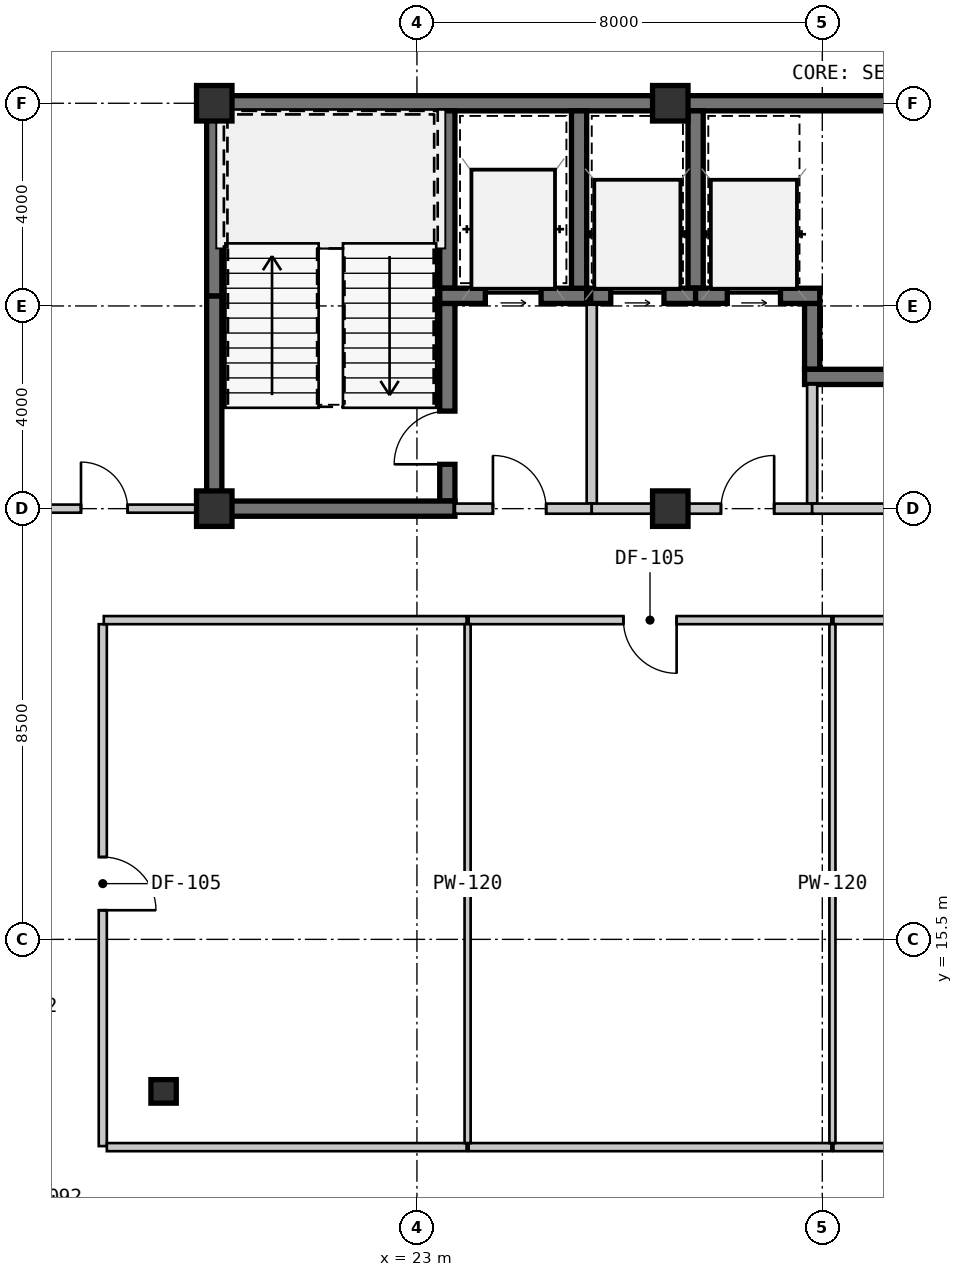
"""IFC4 building model, lengths in metres.
Left out: names, types, materials, properties, quantities, classifications, styles, units other than length and angle.
Written with IfcOpenShell. Run it as: python <this file> out.ifc"""

import sys

from ifc_helpers import new_model, si_unit, direction, frame, frame_2d, origin, origin_2d, place, context, subcontext, project, spatial, rectangle, i_section, extrude, source, transform, mapped, element, fill, save


model = new_model("IFC4")
c1 = context("Model", 3, precision=1e-05, world=origin(), true_north=direction((0.0, 1.0)))
c2 = subcontext(c1, "Body", "Model", "MODEL_VIEW")
j1 = project(units=[si_unit("LENGTHUNIT", "METRE"), si_unit("PLANEANGLEUNIT", "RADIAN")], contexts=[c1])
p1 = place(None, origin())
s1 = spatial("IfcSite", under=j1, at=p1, CompositionType="ELEMENT")
p2 = place(p1, origin())
s2 = spatial("IfcBuilding", under=s1, at=p2, CompositionType="ELEMENT")
p3 = place(p2, frame((0.0, 0.0, 93.45)))
s3 = spatial("IfcBuildingStorey", under=s2, at=p3, CompositionType="ELEMENT", Elevation=93.45)
m1 = source(origin(), c2, "Body", "SweptSolid", [
    extrude(rectangle(XDim=0.7, YDim=0.7, at=origin_2d()), origin(), (0.0, 0.0, 1.0), 3.15),
])
for number, where, z_axis, x_axis in (
    (1, (19.0, 24.0, 0.0), (0.0, 0.0, 1.0), (1.0, 0.0, 0.0)),
    (2, (28.0, 24.0, 0.0), (0.0, 0.0, 1.0), (1.0, 0.0, 0.0)),
    (3, (19.0, 32.0, 0.0), (0.0, 0.0, 1.0), (1.0, 0.0, 0.0)),
    (4, (28.0, 32.0, 0.0), (0.0, 0.0, 1.0), (1.0, 0.0, 0.0)),
):
    element("IfcColumn", number, at=place(p3, frame(where, z_axis=z_axis, x_axis=x_axis)), inside=s3, PredefinedType="COLUMN", context=c2, shape_type="MappedRepresentation", body=[
        mapped(m1, transform((0.0, 0.0, 0.0), scale=1.0)),
    ])
m2 = source(origin(), c2, "Body", "SweptSolid", [
    extrude(i_section(OverallWidth=0.5, OverallDepth=0.464, WebThickness=0.022, FlangeThickness=0.034, at=origin_2d()), origin(), (0.0, 0.0, 1.0), 3.15),
])
p4 = place(p3, frame((18.0, 12.5, 0.0), z_axis=(0.0, 0.0, 1.0), x_axis=(1.0, 0.0, 0.0)))
e5 = element("IfcColumn", 5, at=p4, inside=s3, PredefinedType="COLUMN", context=c2, shape_type="MappedRepresentation", body=[
    mapped(m2, transform((0.0, 0.0, 0.0), scale=1.0)),
])
m3 = source(origin(), c2, "Body", "SweptSolid", [
    extrude(rectangle(XDim=9.15, YDim=0.3, at=frame_2d((4.575, 0.0))), origin(), (0.0, 0.0, 1.0), 2.93),
])
p5 = place(p3, frame((18.85, 32.0, 0.0), z_axis=(0.0, 0.0, 1.0), x_axis=(1.0, 0.0, 0.0)))
e6 = element("IfcWall", 6, at=p5, inside=s3, PredefinedType="SHEAR", context=c2, shape_type="MappedRepresentation", body=[
    mapped(m3, transform((0.0, 0.0, 0.0), scale=1.0)),
])
m4 = source(origin(), c2, "Body", "SweptSolid", [
    extrude(rectangle(XDim=11.2, YDim=0.3, at=frame_2d((5.6, 0.0))), origin(), (0.0, 0.0, 1.0), 2.93),
])
p6 = place(p3, frame((28.0, 32.0, 0.0), z_axis=(0.0, 0.0, 1.0), x_axis=(1.0, 0.0, 0.0)))
e7 = element("IfcWall", 7, at=p6, inside=s3, PredefinedType="SHEAR", context=c2, shape_type="MappedRepresentation", body=[
    mapped(m4, transform((0.0, 0.0, 0.0), scale=1.0)),
])
m5 = source(origin(), c2, "Body", "SweptSolid", [
    extrude(rectangle(XDim=4.05, YDim=0.3, at=frame_2d((2.025, 0.0))), origin(), (0.0, 0.0, 1.0), 2.93),
])
p7 = place(p3, frame((19.0, 24.15, 0.0), z_axis=(0.0, 0.0, 1.0), x_axis=(0.0, 1.0, 0.0)))
e8 = element("IfcWall", 8, at=p7, inside=s3, PredefinedType="SHEAR", context=c2, shape_type="MappedRepresentation", body=[
    mapped(m5, transform((0.0, 0.0, 0.0), scale=1.0)),
])
m6 = source(origin(), c2, "Body", "SweptSolid", [
    extrude(rectangle(XDim=3.65, YDim=0.3, at=frame_2d((1.825, 0.0))), origin(), (0.0, 0.0, 1.0), 2.93),
])
p8 = place(p3, frame((19.0, 28.2, 0.0), z_axis=(0.0, 0.0, 1.0), x_axis=(0.0, 1.0, 0.0)))
e9 = element("IfcWall", 9, at=p8, inside=s3, PredefinedType="SHEAR", context=c2, shape_type="MappedRepresentation", body=[
    mapped(m6, transform((0.0, 0.0, 0.0), scale=1.0)),
])
m7 = source(origin(), c2, "Body", "SweptSolid", [
    extrude(rectangle(XDim=3.5, YDim=0.3, at=frame_2d((1.75, 0.0))), origin(), (0.0, 0.0, 1.0), 2.93),
])
p9 = place(p3, frame((23.6, 28.35, 0.0), z_axis=(0.0, 0.0, 1.0), x_axis=(0.0, 1.0, 0.0)))
e10 = element("IfcWall", 10, at=p9, inside=s3, PredefinedType="SHEAR", context=c2, shape_type="MappedRepresentation", body=[
    mapped(m7, transform((0.0, 0.0, 0.0), scale=1.0)),
])
m8 = source(origin(), c2, "Body", "SweptSolid", [
    extrude(rectangle(XDim=3.9, YDim=0.3, at=frame_2d((1.95, 0.0))), origin(), (0.0, 0.0, 1.0), 2.93),
])
p10 = place(p3, frame((23.6, 24.15, 0.0), z_axis=(0.0, 0.0, 1.0), x_axis=(0.0, 1.0, 0.0)))
e11 = element("IfcWall", 11, at=p10, inside=s3, PredefinedType="SHEAR", context=c2, shape_type="MappedRepresentation", body=[
    mapped(m8, transform((0.0, 0.0, 0.0), scale=1.0)),
])
m9 = source(origin(), c2, "Body", "SweptSolid", [
    extrude(rectangle(XDim=1.05, YDim=2.1, at=frame_2d((0.525, 1.05))), frame((0.0, 0.16, 0.0), z_axis=(0.0, -1.0, 0.0), x_axis=(1.0, 0.0, 0.0)), (0.0, 0.0, 1.0), 0.32),
])
p11 = place(p10, frame((0.725, 0.0, 0.0)))
e12 = element("IfcOpeningElement", 12, at=p11, cuts=e11, PredefinedType="OPENING", context=c2, shape_type="MappedRepresentation", body=[
    mapped(m9, transform((0.0, 0.0, 0.0), scale=1.0)),
])
m10 = source(origin(), c2, "Body", "SweptSolid", [
    extrude(rectangle(XDim=4.9, YDim=0.3, at=frame_2d((2.45, 0.0))), origin(), (0.0, 0.0, 1.0), 2.93),
])
p12 = place(p3, frame((18.85, 24.0, 0.0), z_axis=(0.0, 0.0, 1.0), x_axis=(1.0, 0.0, 0.0)))
e13 = element("IfcWall", 13, at=p12, inside=s3, PredefinedType="SHEAR", context=c2, shape_type="MappedRepresentation", body=[
    mapped(m10, transform((0.0, 0.0, 0.0), scale=1.0)),
])
m11 = source(origin(), c2, "Body", "SweptSolid", [
    extrude(rectangle(XDim=2.9, YDim=0.3, at=frame_2d((1.45, 0.0))), origin(), (0.0, 0.0, 1.0), 2.93),
])
p13 = place(p3, frame((23.45, 28.2, 0.0), z_axis=(0.0, 0.0, 1.0), x_axis=(1.0, 0.0, 0.0)))
e14 = element("IfcWall", 14, at=p13, inside=s3, PredefinedType="SHEAR", context=c2, shape_type="MappedRepresentation", body=[
    mapped(m11, transform((0.0, 0.0, 0.0), scale=1.0)),
])
m12 = source(origin(), c2, "Body", "SweptSolid", [
    extrude(rectangle(XDim=1.1, YDim=2.15, at=frame_2d((0.55, 1.075))), frame((0.0, 0.16, 0.0), z_axis=(0.0, -1.0, 0.0), x_axis=(1.0, 0.0, 0.0)), (0.0, 0.0, 1.0), 0.32),
])
p14 = place(p13, frame((0.9, 0.0, 0.0)))
e15 = element("IfcOpeningElement", 15, at=p14, cuts=e14, PredefinedType="OPENING", context=c2, shape_type="MappedRepresentation", body=[
    mapped(m12, transform((0.0, 0.0, 0.0), scale=1.0)),
])
p15 = place(p3, frame((26.2, 28.35, 0.0), z_axis=(0.0, 0.0, 1.0), x_axis=(0.0, 1.0, 0.0)))
e16 = element("IfcWall", 16, at=p15, inside=s3, PredefinedType="SHEAR", context=c2, shape_type="MappedRepresentation", body=[
    mapped(m7, transform((0.0, 0.0, 0.0), scale=1.0)),
])
m13 = source(origin(), c2, "Body", "SweptSolid", [
    extrude(rectangle(XDim=3.95, YDim=0.2, at=frame_2d((1.975, 0.0))), origin(), (0.0, 0.0, 1.0), 2.93),
])
p16 = place(p3, frame((26.45, 24.1, 0.0), z_axis=(0.0, 0.0, 1.0), x_axis=(0.0, 1.0, 0.0)))
e17 = element("IfcWall", 17, at=p16, inside=s3, PredefinedType="SOLIDWALL", context=c2, shape_type="MappedRepresentation", body=[
    mapped(m13, transform((0.0, 0.0, 0.0), scale=1.0)),
])
m14 = source(origin(), c2, "Body", "SweptSolid", [
    extrude(rectangle(XDim=2.7, YDim=0.2, at=frame_2d((1.35, 0.0))), origin(), (0.0, 0.0, 1.0), 2.47),
])
p17 = place(p3, frame((23.75, 24.0, 0.0), z_axis=(0.0, 0.0, 1.0), x_axis=(1.0, 0.0, 0.0)))
e18 = element("IfcWall", 18, at=p17, inside=s3, PredefinedType="SOLIDWALL", context=c2, shape_type="MappedRepresentation", body=[
    mapped(m14, transform((0.0, 0.0, 0.0), scale=1.0)),
])
m15 = source(origin(), c2, "Body", "SweptSolid", [
    extrude(rectangle(XDim=1.05, YDim=2.1, at=frame_2d((0.525, 1.05))), frame((0.0, 0.11, 0.0), z_axis=(0.0, -1.0, 0.0), x_axis=(1.0, 0.0, 0.0)), (0.0, 0.0, 1.0), 0.22),
])
p18 = place(p17, frame((0.75, 0.0, 0.0)))
e19 = element("IfcOpeningElement", 19, at=p18, cuts=e18, PredefinedType="OPENING", context=c2, shape_type="MappedRepresentation", body=[
    mapped(m15, transform((0.0, 0.0, 0.0), scale=1.0)),
])
m16 = source(origin(), c2, "Body", "SweptSolid", [
    extrude(rectangle(XDim=1.3, YDim=0.3, at=frame_2d((0.65, 0.0))), origin(), (0.0, 0.0, 1.0), 2.93),
])
p19 = place(p3, frame((30.8, 28.05, 0.0), z_axis=(0.0, 0.0, 1.0), x_axis=(0.0, -1.0, 0.0)))
e20 = element("IfcWall", 20, at=p19, inside=s3, PredefinedType="SHEAR", context=c2, shape_type="MappedRepresentation", body=[
    mapped(m16, transform((0.0, 0.0, 0.0), scale=1.0)),
])
m17 = source(origin(), c2, "Body", "SweptSolid", [
    extrude(rectangle(XDim=2.35, YDim=0.3, at=frame_2d((1.175, 0.0))), origin(), (0.0, 0.0, 1.0), 2.93),
])
p20 = place(p3, frame((30.65, 26.6, 0.0), z_axis=(0.0, 0.0, 1.0), x_axis=(1.0, 0.0, 0.0)))
e21 = element("IfcWall", 21, at=p20, inside=s3, PredefinedType="SHEAR", context=c2, shape_type="MappedRepresentation", body=[
    mapped(m17, transform((0.0, 0.0, 0.0), scale=1.0)),
])
p21 = place(p3, frame((28.5, 28.35, 0.0), z_axis=(0.0, 0.0, 1.0), x_axis=(0.0, 1.0, 0.0)))
e22 = element("IfcWall", 22, at=p21, inside=s3, PredefinedType="SHEAR", context=c2, shape_type="MappedRepresentation", body=[
    mapped(m7, transform((0.0, 0.0, 0.0), scale=1.0)),
])
m18 = source(origin(), c2, "Body", "SweptSolid", [
    extrude(rectangle(XDim=2.07, YDim=0.3, at=frame_2d((1.035, 0.0))), origin(), (0.0, 0.0, 1.0), 2.93),
])
p22 = place(p3, frame((26.43, 28.2, 0.0), z_axis=(0.0, 0.0, 1.0), x_axis=(1.0, 0.0, 0.0)))
e23 = element("IfcWall", 23, at=p22, inside=s3, PredefinedType="SHEAR", context=c2, shape_type="MappedRepresentation", body=[
    mapped(m18, transform((0.0, 0.0, 0.0), scale=1.0)),
])
m19 = source(origin(), c2, "Body", "SweptSolid", [
    extrude(rectangle(XDim=1.05, YDim=2.15, at=frame_2d((0.525, 1.075))), frame((0.0, 0.16, 0.0), z_axis=(0.0, -1.0, 0.0), x_axis=(1.0, 0.0, 0.0)), (0.0, 0.0, 1.0), 0.32),
])
p23 = place(p22, frame((0.395, 0.0, 0.0)))
e24 = element("IfcOpeningElement", 24, at=p23, cuts=e23, PredefinedType="OPENING", context=c2, shape_type="MappedRepresentation", body=[
    mapped(m19, transform((0.0, 0.0, 0.0), scale=1.0)),
])
m20 = source(origin(), c2, "Body", "SweptSolid", [
    extrude(rectangle(XDim=2.45, YDim=0.3, at=frame_2d((1.225, 0.0))), origin(), (0.0, 0.0, 1.0), 2.93),
])
p24 = place(p3, frame((28.5, 28.2, 0.0), z_axis=(0.0, 0.0, 1.0), x_axis=(1.0, 0.0, 0.0)))
e25 = element("IfcWall", 25, at=p24, inside=s3, PredefinedType="SHEAR", context=c2, shape_type="MappedRepresentation", body=[
    mapped(m20, transform((0.0, 0.0, 0.0), scale=1.0)),
])
p25 = place(p24, frame((0.625, 0.0, 0.0)))
e26 = element("IfcOpeningElement", 26, at=p25, cuts=e25, PredefinedType="OPENING", context=c2, shape_type="MappedRepresentation", body=[
    mapped(m19, transform((0.0, 0.0, 0.0), scale=1.0)),
])
m21 = source(origin(), c2, "Body", "SweptSolid", [
    extrude(rectangle(XDim=2.35, YDim=0.2, at=frame_2d((1.175, 0.0))), origin(), (0.0, 0.0, 1.0), 2.93),
])
p26 = place(p3, frame((30.8, 26.45, 0.0), z_axis=(0.0, 0.0, 1.0), x_axis=(0.0, -1.0, 0.0)))
e27 = element("IfcWall", 27, at=p26, inside=s3, PredefinedType="SOLIDWALL", context=c2, shape_type="MappedRepresentation", body=[
    mapped(m21, transform((0.0, 0.0, 0.0), scale=1.0)),
])
m22 = source(origin(), c2, "Body", "SweptSolid", [
    extrude(rectangle(XDim=4.35, YDim=0.2, at=frame_2d((2.175, 0.0))), origin(), (0.0, 0.0, 1.0), 2.47),
])
p27 = place(p3, frame((30.8, 24.0, 0.0), z_axis=(0.0, 0.0, 1.0), x_axis=(-1.0, 0.0, 0.0)))
e28 = element("IfcWall", 28, at=p27, inside=s3, PredefinedType="SOLIDWALL", context=c2, shape_type="MappedRepresentation", body=[
    mapped(m22, transform((0.0, 0.0, 0.0), scale=1.0)),
])
p28 = place(p27, frame((0.75, 0.0, 0.0)))
e29 = element("IfcOpeningElement", 29, at=p28, cuts=e28, PredefinedType="OPENING", context=c2, shape_type="MappedRepresentation", body=[
    mapped(m15, transform((0.0, 0.0, 0.0), scale=1.0)),
])
m23 = source(origin(), c2, "Body", "SweptSolid", [
    extrude(rectangle(XDim=4.35, YDim=0.2, at=frame_2d((2.175, 0.0))), origin(), (0.0, 0.0, 1.0), 2.47),
])
p29 = place(p3, frame((35.15, 24.0, 0.0), z_axis=(0.0, 0.0, 1.0), x_axis=(-1.0, 0.0, 0.0)))
e30 = element("IfcWall", 30, at=p29, inside=s3, PredefinedType="SOLIDWALL", context=c2, shape_type="MappedRepresentation", body=[
    mapped(m23, transform((0.0, 0.0, 0.0), scale=1.0)),
])
p30 = place(p29, frame((1.65, 0.0, 0.0)))
e31 = element("IfcOpeningElement", 31, at=p30, cuts=e30, PredefinedType="OPENING", context=c2, shape_type="MappedRepresentation", body=[
    mapped(m15, transform((0.0, 0.0, 0.0), scale=1.0)),
])
m24 = source(origin(), c2, "Body", "SweptSolid", [
    extrude(rectangle(XDim=10.3, YDim=0.16, at=frame_2d((5.15, 0.0))), origin(), (0.0, 0.0, 1.0), 2.93),
])
p31 = place(p3, frame((16.8, 21.72, 0.0), z_axis=(0.0, 0.0, 1.0), x_axis=(0.0, -1.0, 0.0)))
e32 = element("IfcWall", 32, at=p31, inside=s3, PredefinedType="PARTITIONING", context=c2, shape_type="MappedRepresentation", body=[
    mapped(m24, transform((0.0, 0.0, 0.0), scale=1.0)),
])
m25 = source(origin(), c2, "Body", "SweptSolid", [
    extrude(rectangle(XDim=1.05, YDim=2.1, at=frame_2d((0.525, 1.05))), frame((0.0, 0.09, 0.0), z_axis=(0.0, -1.0, 0.0), x_axis=(1.0, 0.0, 0.0)), (0.0, 0.0, 1.0), 0.18),
])
p32 = place(p31, frame((4.595, 0.0, 0.0)))
e33 = element("IfcOpeningElement", 33, at=p32, cuts=e32, PredefinedType="OPENING", context=c2, shape_type="MappedRepresentation", body=[
    mapped(m25, transform((0.0, 0.0, 0.0), scale=1.0)),
])
m26 = source(origin(), c2, "Body", "SweptSolid", [
    extrude(rectangle(XDim=7.159, YDim=0.16, at=frame_2d((3.58, 0.0))), origin(), (0.0, 0.0, 1.0), 2.93),
])
p33 = place(p3, frame((23.98, 21.8, 0.0), z_axis=(0.0, 0.0, 1.0), x_axis=(-1.0, 0.0, 0.0)))
e34 = element("IfcWall", 34, at=p33, inside=s3, PredefinedType="PARTITIONING", context=c2, shape_type="MappedRepresentation", body=[
    mapped(m26, transform((0.0, 0.0, 0.0), scale=1.0)),
])
p34 = place(p3, frame((31.18, 21.8, 0.0), z_axis=(0.0, 0.0, 1.0), x_axis=(-1.0, 0.0, 0.0)))
e35 = element("IfcWall", 35, at=p34, inside=s3, PredefinedType="PARTITIONING", context=c2, shape_type="MappedRepresentation", body=[
    mapped(m26, transform((0.0, 0.0, 0.0), scale=1.0)),
])
p35 = place(p34, frame((3.055, 0.0, 0.0)))
e36 = element("IfcOpeningElement", 36, at=p35, cuts=e35, PredefinedType="OPENING", context=c2, shape_type="MappedRepresentation", body=[
    mapped(m25, transform((0.0, 0.0, 0.0), scale=1.0)),
])
m27 = source(origin(), c2, "Body", "SweptSolid", [
    extrude(rectangle(XDim=7.26, YDim=0.16, at=frame_2d((3.63, 0.0))), origin(), (0.0, 0.0, 1.0), 2.93),
])
p36 = place(p3, frame((38.48, 21.8, 0.0), z_axis=(0.0, 0.0, 1.0), x_axis=(-1.0, 0.0, 0.0)))
e37 = element("IfcWall", 37, at=p36, inside=s3, PredefinedType="PARTITIONING", context=c2, shape_type="MappedRepresentation", body=[
    mapped(m27, transform((0.0, 0.0, 0.0), scale=1.0)),
])
p37 = place(p36, frame((3.105, 0.0, 0.0)))
e38 = element("IfcOpeningElement", 38, at=p37, cuts=e37, PredefinedType="OPENING", context=c2, shape_type="MappedRepresentation", body=[
    mapped(m25, transform((0.0, 0.0, 0.0), scale=1.0)),
])
m28 = source(origin(), c2, "Body", "SweptSolid", [
    extrude(rectangle(XDim=4.17, YDim=0.16, at=frame_2d((2.085, 0.0))), origin(), (0.0, 0.0, 1.0), 2.93),
])
p38 = place(p3, frame((14.68, 24.0, 0.0), z_axis=(0.0, 0.0, 1.0), x_axis=(1.0, 0.0, 0.0)))
e39 = element("IfcWall", 39, at=p38, inside=s3, PredefinedType="PARTITIONING", context=c2, shape_type="MappedRepresentation", body=[
    mapped(m28, transform((0.0, 0.0, 0.0), scale=1.0)),
])
m29 = source(origin(), c2, "Body", "SweptSolid", [
    extrude(rectangle(XDim=0.92, YDim=2.1, at=frame_2d((0.46, 1.05))), frame((0.0, 0.09, 0.0), z_axis=(0.0, -1.0, 0.0), x_axis=(1.0, 0.0, 0.0)), (0.0, 0.0, 1.0), 0.18),
])
p39 = place(p38, frame((1.69, 0.0, 0.0)))
e40 = element("IfcOpeningElement", 40, at=p39, cuts=e39, PredefinedType="OPENING", context=c2, shape_type="MappedRepresentation", body=[
    mapped(m29, transform((0.0, 0.0, 0.0), scale=1.0)),
])
m30 = source(origin(), c2, "Body", "SweptSolid", [
    extrude(rectangle(XDim=7.1, YDim=0.16, at=frame_2d((3.55, 0.0))), origin(), (0.0, 0.0, 1.0), 2.93),
])
p40 = place(p3, frame((16.88, 11.4, 0.0), z_axis=(0.0, 0.0, 1.0), x_axis=(1.0, 0.0, 0.0)))
e41 = element("IfcWall", 41, at=p40, inside=s3, PredefinedType="PARTITIONING", context=c2, shape_type="MappedRepresentation", body=[
    mapped(m30, transform((0.0, 0.0, 0.0), scale=1.0)),
])
p41 = place(p3, frame((24.02, 11.4, 0.0), z_axis=(0.0, 0.0, 1.0), x_axis=(1.0, 0.0, 0.0)))
e42 = element("IfcWall", 42, at=p41, inside=s3, PredefinedType="PARTITIONING", context=c2, shape_type="MappedRepresentation", body=[
    mapped(m26, transform((0.0, 0.0, 0.0), scale=1.0)),
])
p42 = place(p3, frame((31.22, 11.4, 0.0), z_axis=(0.0, 0.0, 1.0), x_axis=(1.0, 0.0, 0.0)))
e43 = element("IfcWall", 43, at=p42, inside=s3, PredefinedType="PARTITIONING", context=c2, shape_type="MappedRepresentation", body=[
    mapped(m27, transform((0.0, 0.0, 0.0), scale=1.0)),
])
m31 = source(origin(), c2, "Body", "SweptSolid", [
    extrude(rectangle(XDim=10.24, YDim=0.12, at=frame_2d((5.12, 0.0))), origin(), (0.0, 0.0, 1.0), 2.93),
])
for number, where, z_axis, x_axis in (
    (44, (24.0, 21.72, 0.0), (0.0, 0.0, 1.0), (0.0, -1.0, 0.0)),
    (45, (31.2, 21.72, 0.0), (0.0, 0.0, 1.0), (0.0, -1.0, 0.0)),
):
    element("IfcWall", number, at=place(p3, frame(where, z_axis=z_axis, x_axis=x_axis)), inside=s3, PredefinedType="PARTITIONING", context=c2, shape_type="MappedRepresentation", body=[
        mapped(m31, transform((0.0, 0.0, 0.0), scale=1.0)),
    ])
m32 = source(origin(), c2, "Body", "SweptSolid", [
    extrude(rectangle(XDim=1.05, YDim=2.1, at=frame_2d((0.525, 1.05))), frame((0.0, 0.025, 0.0), z_axis=(0.0, -1.0, 0.0), x_axis=(1.0, 0.0, 0.0)), (0.0, 0.0, 1.0), 0.05),
])
p43 = place(p11, origin())
e46 = element("IfcDoor", 46, at=p43, inside=s3, OperationType="SINGLE_SWING_LEFT", PredefinedType="DOOR", context=c2, shape_type="MappedRepresentation", body=[
    mapped(m32, transform((0.0, 0.0, 0.0), scale=1.0)),
])
fill(e12, e46)
m33 = source(origin(), c2, "Body", "SweptSolid", [
    extrude(rectangle(XDim=1.1, YDim=2.15, at=frame_2d((0.55, 1.075))), frame((0.0, 0.025, 0.0), z_axis=(0.0, -1.0, 0.0), x_axis=(1.0, 0.0, 0.0)), (0.0, 0.0, 1.0), 0.05),
])
p44 = place(p14, origin())
e47 = element("IfcDoor", 47, at=p44, inside=s3, OperationType="SLIDING_TO_LEFT", PredefinedType="DOOR", context=c2, shape_type="MappedRepresentation", body=[
    mapped(m33, transform((0.0, 0.0, 0.0), scale=1.0)),
])
fill(e15, e47)
p45 = place(p18, origin())
e48 = element("IfcDoor", 48, at=p45, inside=s3, OperationType="SINGLE_SWING_LEFT", PredefinedType="DOOR", context=c2, shape_type="MappedRepresentation", body=[
    mapped(m32, transform((0.0, 0.0, 0.0), scale=1.0)),
])
fill(e19, e48)
m34 = source(origin(), c2, "Body", "SweptSolid", [
    extrude(rectangle(XDim=1.05, YDim=2.15, at=frame_2d((0.525, 1.075))), frame((0.0, 0.025, 0.0), z_axis=(0.0, -1.0, 0.0), x_axis=(1.0, 0.0, 0.0)), (0.0, 0.0, 1.0), 0.05),
])
p46 = place(p23, origin())
e49 = element("IfcDoor", 49, at=p46, inside=s3, OperationType="SLIDING_TO_LEFT", PredefinedType="DOOR", context=c2, shape_type="MappedRepresentation", body=[
    mapped(m34, transform((0.0, 0.0, 0.0), scale=1.0)),
])
fill(e24, e49)
p47 = place(p25, origin())
e50 = element("IfcDoor", 50, at=p47, inside=s3, OperationType="SLIDING_TO_LEFT", PredefinedType="DOOR", context=c2, shape_type="MappedRepresentation", body=[
    mapped(m34, transform((0.0, 0.0, 0.0), scale=1.0)),
])
fill(e26, e50)
p48 = place(p28, frame((1.05, 0.0, 0.0), z_axis=(0.0, 0.0, 1.0), x_axis=(-1.0, 0.0, 0.0)))
e51 = element("IfcDoor", 51, at=p48, inside=s3, OperationType="SINGLE_SWING_RIGHT", PredefinedType="DOOR", context=c2, shape_type="MappedRepresentation", body=[
    mapped(m32, transform((0.0, 0.0, 0.0), scale=1.0)),
])
fill(e29, e51)
p49 = place(p32, origin())
e52 = element("IfcDoor", 52, at=p49, inside=s3, OperationType="SINGLE_SWING_RIGHT", PredefinedType="DOOR", context=c2, shape_type="MappedRepresentation", body=[
    mapped(m32, transform((0.0, 0.0, 0.0), scale=1.0)),
])
fill(e33, e52)
p50 = place(p35, origin())
e53 = element("IfcDoor", 53, at=p50, inside=s3, OperationType="SINGLE_SWING_LEFT", PredefinedType="DOOR", context=c2, shape_type="MappedRepresentation", body=[
    mapped(m32, transform((0.0, 0.0, 0.0), scale=1.0)),
])
fill(e36, e53)
m35 = source(origin(), c2, "Body", "SweptSolid", [
    extrude(rectangle(XDim=0.92, YDim=2.1, at=frame_2d((0.46, 1.05))), frame((0.0, 0.025, 0.0), z_axis=(0.0, -1.0, 0.0), x_axis=(1.0, 0.0, 0.0)), (0.0, 0.0, 1.0), 0.05),
])
p51 = place(p39, origin())
e54 = element("IfcDoor", 54, at=p51, inside=s3, OperationType="SINGLE_SWING_LEFT", PredefinedType="DOOR", context=c2, shape_type="MappedRepresentation", body=[
    mapped(m35, transform((0.0, 0.0, 0.0), scale=1.0)),
])
fill(e40, e54)
save(model, sys.argv[1])
